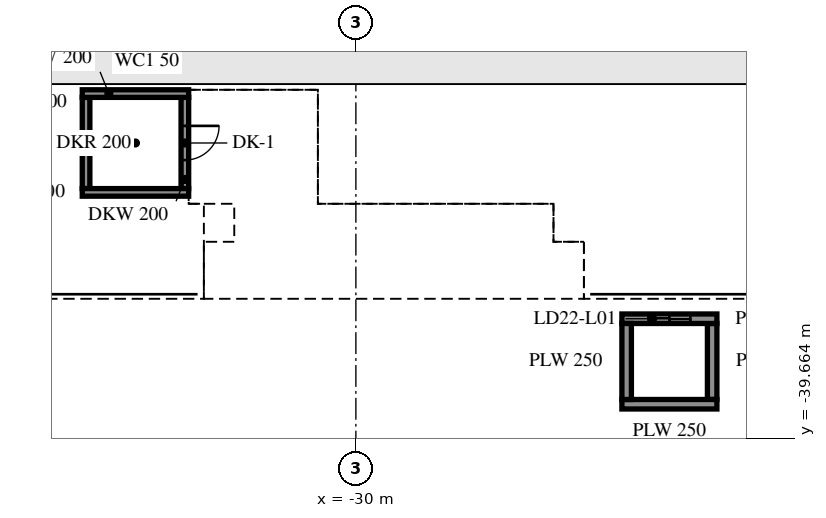
"""IFC4 building model, lengths in metres.
Left out: names, types, materials, properties, quantities, classifications, styles, units other than length and angle.
Written with IfcOpenShell. Run it as: python <this file> out.ifc"""

import sys

from ifc_helpers import new_model, si_unit, direction, frame, frame_2d, origin, place, context, subcontext, project, spatial, polyline, rectangle, outline, extrude, element, fill, save


model = new_model("IFC4")
c1 = context("Model", 3, precision=1e-05, world=origin(), true_north=direction((0.0, 1.0)))
c2 = subcontext(c1, "Body", "Model", "MODEL_VIEW")
j1 = project(units=[si_unit("LENGTHUNIT", "METRE"), si_unit("PLANEANGLEUNIT", "RADIAN")], contexts=[c1])
p1 = place(None, origin())
s1 = spatial("IfcSite", under=j1, at=p1, CompositionType="ELEMENT")
p2 = place(p1, origin())
s2 = spatial("IfcBuilding", under=s1, at=p2, CompositionType="ELEMENT")
p3 = place(p2, frame((0.0, 0.0, 7.2)))
s3 = spatial("IfcBuildingStorey", under=s2, at=p3, CompositionType="ELEMENT", Elevation=7.2)
p4 = place(p3, origin())
e1 = element("IfcWall", 1, at=p4, inside=s3, PredefinedType="NOTDEFINED", context=c2, shape_type="SweptSolid", body=[
    extrude(outline(polyline([(-37.0, -34.5), (-34.0, -34.5), (-34.0, -34.0), (-37.0, -34.0), (-37.0, -34.5)])), origin(), (0.0, 0.0, 1.0), 11.34),
])
p5 = place(p3, origin())
e2 = element("IfcWall", 2, at=p5, inside=s3, PredefinedType="NOTDEFINED", context=c2, shape_type="SweptSolid", body=[
    extrude(outline(polyline([(-24.0, -34.5), (-21.0, -34.5), (-21.0, -34.0), (-24.0, -34.0), (-24.0, -34.5)])), origin(), (0.0, 0.0, 1.0), 11.34),
])
p6 = place(p3, frame((0.0, 0.0, 11.34)))
e3 = element("IfcWall", 3, at=p6, inside=s3, PredefinedType="NOTDEFINED", context=c2, shape_type="SweptSolid", body=[
    extrude(outline(polyline([(-37.0, -34.5), (-33.982, -34.5), (-33.982, -34.0), (-37.0, -34.0), (-37.0, -34.5)])), origin(), (0.0, 0.0, 1.0), 0.6),
])
p7 = place(p3, frame((0.0, 0.0, 11.34)))
e4 = element("IfcWall", 4, at=p7, inside=s3, PredefinedType="NOTDEFINED", context=c2, shape_type="SweptSolid", body=[
    extrude(outline(polyline([(-24.018, -34.5), (-21.0, -34.5), (-21.0, -34.0), (-24.018, -34.0), (-24.018, -34.5)])), origin(), (0.0, 0.0, 1.0), 0.6),
])
p8 = place(p3, frame((0.0, 0.0, 11.94)))
e5 = element("IfcWall", 5, at=p8, inside=s3, PredefinedType="NOTDEFINED", context=c2, shape_type="SweptSolid", body=[
    extrude(outline(polyline([(-37.0, -34.5), (-33.928, -34.5), (-33.928, -34.0), (-37.0, -34.0), (-37.0, -34.5)])), origin(), (0.0, 0.0, 1.0), 0.6),
])
p9 = place(p3, frame((0.0, 0.0, 11.94)))
e6 = element("IfcWall", 6, at=p9, inside=s3, PredefinedType="NOTDEFINED", context=c2, shape_type="SweptSolid", body=[
    extrude(outline(polyline([(-24.072, -34.5), (-21.0, -34.5), (-21.0, -34.0), (-24.072, -34.0), (-24.072, -34.5)])), origin(), (0.0, 0.0, 1.0), 0.6),
])
p10 = place(p3, frame((0.0, 0.0, 12.54)))
e7 = element("IfcWall", 7, at=p10, inside=s3, PredefinedType="NOTDEFINED", context=c2, shape_type="SweptSolid", body=[
    extrude(outline(polyline([(-37.0, -34.5), (-33.837, -34.5), (-33.837, -34.0), (-37.0, -34.0), (-37.0, -34.5)])), origin(), (0.0, 0.0, 1.0), 0.6),
])
p11 = place(p3, frame((0.0, 0.0, 12.54)))
e8 = element("IfcWall", 8, at=p11, inside=s3, PredefinedType="NOTDEFINED", context=c2, shape_type="SweptSolid", body=[
    extrude(outline(polyline([(-24.163, -34.5), (-21.0, -34.5), (-21.0, -34.0), (-24.163, -34.0), (-24.163, -34.5)])), origin(), (0.0, 0.0, 1.0), 0.6),
])
p12 = place(p3, frame((0.0, 0.0, 13.14)))
e9 = element("IfcWall", 9, at=p12, inside=s3, PredefinedType="NOTDEFINED", context=c2, shape_type="SweptSolid", body=[
    extrude(outline(polyline([(-37.0, -34.5), (-33.708, -34.5), (-33.708, -34.0), (-37.0, -34.0), (-37.0, -34.5)])), origin(), (0.0, 0.0, 1.0), 0.6),
])
p13 = place(p3, frame((0.0, 0.0, 13.14)))
e10 = element("IfcWall", 10, at=p13, inside=s3, PredefinedType="NOTDEFINED", context=c2, shape_type="SweptSolid", body=[
    extrude(outline(polyline([(-24.292, -34.5), (-21.0, -34.5), (-21.0, -34.0), (-24.292, -34.0), (-24.292, -34.5)])), origin(), (0.0, 0.0, 1.0), 0.6),
])
p14 = place(p3, frame((0.0, 0.0, 13.74)))
e11 = element("IfcWall", 11, at=p14, inside=s3, PredefinedType="NOTDEFINED", context=c2, shape_type="SweptSolid", body=[
    extrude(outline(polyline([(-37.0, -34.5), (-33.539, -34.5), (-33.539, -34.0), (-37.0, -34.0), (-37.0, -34.5)])), origin(), (0.0, 0.0, 1.0), 0.6),
])
p15 = place(p3, frame((0.0, 0.0, 13.74)))
e12 = element("IfcWall", 12, at=p15, inside=s3, PredefinedType="NOTDEFINED", context=c2, shape_type="SweptSolid", body=[
    extrude(outline(polyline([(-24.461, -34.5), (-21.0, -34.5), (-21.0, -34.0), (-24.461, -34.0), (-24.461, -34.5)])), origin(), (0.0, 0.0, 1.0), 0.6),
])
p16 = place(p3, frame((0.0, 0.0, 14.34)))
e13 = element("IfcWall", 13, at=p16, inside=s3, PredefinedType="NOTDEFINED", context=c2, shape_type="SweptSolid", body=[
    extrude(outline(polyline([(-37.0, -34.5), (-33.33, -34.5), (-33.33, -34.0), (-37.0, -34.0), (-37.0, -34.5)])), origin(), (0.0, 0.0, 1.0), 0.6),
])
p17 = place(p3, frame((0.0, 0.0, 14.34)))
e14 = element("IfcWall", 14, at=p17, inside=s3, PredefinedType="NOTDEFINED", context=c2, shape_type="SweptSolid", body=[
    extrude(outline(polyline([(-24.67, -34.5), (-21.0, -34.5), (-21.0, -34.0), (-24.67, -34.0), (-24.67, -34.5)])), origin(), (0.0, 0.0, 1.0), 0.6),
])
p18 = place(p3, frame((0.0, 0.0, 14.94)))
e15 = element("IfcWall", 15, at=p18, inside=s3, PredefinedType="NOTDEFINED", context=c2, shape_type="SweptSolid", body=[
    extrude(outline(polyline([(-37.0, -34.5), (-33.075, -34.5), (-33.075, -34.0), (-37.0, -34.0), (-37.0, -34.5)])), origin(), (0.0, 0.0, 1.0), 0.6),
])
p19 = place(p3, frame((0.0, 0.0, 14.94)))
e16 = element("IfcWall", 16, at=p19, inside=s3, PredefinedType="NOTDEFINED", context=c2, shape_type="SweptSolid", body=[
    extrude(outline(polyline([(-24.925, -34.5), (-21.0, -34.5), (-21.0, -34.0), (-24.925, -34.0), (-24.925, -34.5)])), origin(), (0.0, 0.0, 1.0), 0.6),
])
p20 = place(p3, frame((0.0, 0.0, 15.54)))
e17 = element("IfcWall", 17, at=p20, inside=s3, PredefinedType="NOTDEFINED", context=c2, shape_type="SweptSolid", body=[
    extrude(outline(polyline([(-37.0, -34.5), (-32.773, -34.5), (-32.773, -34.0), (-37.0, -34.0), (-37.0, -34.5)])), origin(), (0.0, 0.0, 1.0), 0.6),
])
p21 = place(p3, frame((0.0, 0.0, 15.54)))
e18 = element("IfcWall", 18, at=p21, inside=s3, PredefinedType="NOTDEFINED", context=c2, shape_type="SweptSolid", body=[
    extrude(outline(polyline([(-25.227, -34.5), (-21.0, -34.5), (-21.0, -34.0), (-25.227, -34.0), (-25.227, -34.5)])), origin(), (0.0, 0.0, 1.0), 0.6),
])
p22 = place(p3, frame((0.0, 0.0, 16.14)))
e19 = element("IfcWall", 19, at=p22, inside=s3, PredefinedType="NOTDEFINED", context=c2, shape_type="SweptSolid", body=[
    extrude(outline(polyline([(-37.0, -34.5), (-32.417, -34.5), (-32.417, -34.0), (-37.0, -34.0), (-37.0, -34.5)])), origin(), (0.0, 0.0, 1.0), 0.6),
])
p23 = place(p3, frame((0.0, 0.0, 16.14)))
e20 = element("IfcWall", 20, at=p23, inside=s3, PredefinedType="NOTDEFINED", context=c2, shape_type="SweptSolid", body=[
    extrude(outline(polyline([(-25.583, -34.5), (-21.0, -34.5), (-21.0, -34.0), (-25.583, -34.0), (-25.583, -34.5)])), origin(), (0.0, 0.0, 1.0), 0.6),
])
p24 = place(p3, frame((0.0, 0.0, 16.74)))
e21 = element("IfcWall", 21, at=p24, inside=s3, PredefinedType="NOTDEFINED", context=c2, shape_type="SweptSolid", body=[
    extrude(outline(polyline([(-37.0, -34.5), (-32.0, -34.5), (-32.0, -34.0), (-37.0, -34.0), (-37.0, -34.5)])), origin(), (0.0, 0.0, 1.0), 0.6),
])
p25 = place(p3, frame((0.0, 0.0, 16.74)))
e22 = element("IfcWall", 22, at=p25, inside=s3, PredefinedType="NOTDEFINED", context=c2, shape_type="SweptSolid", body=[
    extrude(outline(polyline([(-26.0, -34.5), (-21.0, -34.5), (-21.0, -34.0), (-26.0, -34.0), (-26.0, -34.5)])), origin(), (0.0, 0.0, 1.0), 0.6),
])
p26 = place(p3, frame((0.0, 0.0, 17.34)))
e23 = element("IfcWall", 23, at=p26, inside=s3, PredefinedType="NOTDEFINED", context=c2, shape_type="SweptSolid", body=[
    extrude(outline(polyline([(-37.0, -34.5), (-31.513, -34.5), (-31.513, -34.0), (-37.0, -34.0), (-37.0, -34.5)])), origin(), (0.0, 0.0, 1.0), 0.6),
])
p27 = place(p3, frame((0.0, 0.0, 17.34)))
e24 = element("IfcWall", 24, at=p27, inside=s3, PredefinedType="NOTDEFINED", context=c2, shape_type="SweptSolid", body=[
    extrude(outline(polyline([(-26.487, -34.5), (-21.0, -34.5), (-21.0, -34.0), (-26.487, -34.0), (-26.487, -34.5)])), origin(), (0.0, 0.0, 1.0), 0.6),
])
p28 = place(p3, frame((0.0, 0.0, 17.94)))
e25 = element("IfcWall", 25, at=p28, inside=s3, PredefinedType="NOTDEFINED", context=c2, shape_type="SweptSolid", body=[
    extrude(outline(polyline([(-37.0, -34.5), (-30.94, -34.5), (-30.94, -34.0), (-37.0, -34.0), (-37.0, -34.5)])), origin(), (0.0, 0.0, 1.0), 0.6),
])
p29 = place(p3, frame((0.0, 0.0, 17.94)))
e26 = element("IfcWall", 26, at=p29, inside=s3, PredefinedType="NOTDEFINED", context=c2, shape_type="SweptSolid", body=[
    extrude(outline(polyline([(-27.06, -34.5), (-21.0, -34.5), (-21.0, -34.0), (-27.06, -34.0), (-27.06, -34.5)])), origin(), (0.0, 0.0, 1.0), 0.6),
])
p30 = place(p3, frame((0.0, 0.0, 18.54)))
e27 = element("IfcWall", 27, at=p30, inside=s3, PredefinedType="NOTDEFINED", context=c2, shape_type="SweptSolid", body=[
    extrude(outline(polyline([(-37.0, -34.5), (-30.258, -34.5), (-30.258, -34.0), (-37.0, -34.0), (-37.0, -34.5)])), origin(), (0.0, 0.0, 1.0), 0.6),
])
p31 = place(p3, frame((0.0, 0.0, 18.54)))
e28 = element("IfcWall", 28, at=p31, inside=s3, PredefinedType="NOTDEFINED", context=c2, shape_type="SweptSolid", body=[
    extrude(outline(polyline([(-27.742, -34.5), (-21.0, -34.5), (-21.0, -34.0), (-27.742, -34.0), (-27.742, -34.5)])), origin(), (0.0, 0.0, 1.0), 0.6),
])
p32 = place(p3, frame((0.0, 0.0, 19.14)))
e29 = element("IfcWall", 29, at=p32, inside=s3, PredefinedType="NOTDEFINED", context=c2, shape_type="SweptSolid", body=[
    extrude(outline(polyline([(-37.0, -34.5), (-29.426, -34.5), (-29.426, -34.0), (-37.0, -34.0), (-37.0, -34.5)])), origin(), (0.0, 0.0, 1.0), 0.6),
])
p33 = place(p3, frame((0.0, 0.0, 19.14)))
e30 = element("IfcWall", 30, at=p33, inside=s3, PredefinedType="NOTDEFINED", context=c2, shape_type="SweptSolid", body=[
    extrude(outline(polyline([(-28.574, -34.5), (-21.0, -34.5), (-21.0, -34.0), (-28.574, -34.0), (-28.574, -34.5)])), origin(), (0.0, 0.0, 1.0), 0.6),
])
p34 = place(p3, frame((0.0, 0.0, 19.74)))
e31 = element("IfcWall", 31, at=p34, inside=s3, PredefinedType="NOTDEFINED", context=c2, shape_type="SweptSolid", body=[
    extrude(outline(polyline([(-37.0, -34.5), (-21.0, -34.5), (-21.0, -34.0), (-37.0, -34.0), (-37.0, -34.5)])), origin(), (0.0, 0.0, 1.0), 0.26),
])
p35 = place(p3, origin())
e32 = element("IfcWall", 32, at=p35, inside=s3, PredefinedType="NOTDEFINED", context=c2, shape_type="SweptSolid", body=[
    extrude(outline(polyline([(-37.0, -34.0), (-33.2, -34.0), (-33.2, -33.5), (-37.0, -33.5), (-37.0, -34.0)])), origin(), (0.0, 0.0, 1.0), 12.725),
])
p36 = place(p3, origin())
e33 = element("IfcWall", 33, at=p36, inside=s3, PredefinedType="NOTDEFINED", context=c2, shape_type="SweptSolid", body=[
    extrude(outline(polyline([(-24.8, -34.0), (-21.0, -34.0), (-21.0, -33.5), (-24.8, -33.5), (-24.8, -34.0)])), origin(), (0.0, 0.0, 1.0), 12.725),
])
p37 = place(p3, frame((0.0, 0.0, 12.725)))
e34 = element("IfcWall", 34, at=p37, inside=s3, PredefinedType="NOTDEFINED", context=c2, shape_type="SweptSolid", body=[
    extrude(outline(polyline([(-37.0, -34.0), (-33.179, -34.0), (-33.179, -33.5), (-37.0, -33.5), (-37.0, -34.0)])), origin(), (0.0, 0.0, 1.0), 0.6),
])
p38 = place(p3, frame((0.0, 0.0, 12.725)))
e35 = element("IfcWall", 35, at=p38, inside=s3, PredefinedType="NOTDEFINED", context=c2, shape_type="SweptSolid", body=[
    extrude(outline(polyline([(-24.821, -34.0), (-21.0, -34.0), (-21.0, -33.5), (-24.821, -33.5), (-24.821, -34.0)])), origin(), (0.0, 0.0, 1.0), 0.6),
])
p39 = place(p3, frame((0.0, 0.0, 13.325)))
e36 = element("IfcWall", 36, at=p39, inside=s3, PredefinedType="NOTDEFINED", context=c2, shape_type="SweptSolid", body=[
    extrude(outline(polyline([(-37.0, -34.0), (-33.114, -34.0), (-33.114, -33.5), (-37.0, -33.5), (-37.0, -34.0)])), origin(), (0.0, 0.0, 1.0), 0.6),
])
p40 = place(p3, frame((0.0, 0.0, 13.325)))
e37 = element("IfcWall", 37, at=p40, inside=s3, PredefinedType="NOTDEFINED", context=c2, shape_type="SweptSolid", body=[
    extrude(outline(polyline([(-24.886, -34.0), (-21.0, -34.0), (-21.0, -33.5), (-24.886, -33.5), (-24.886, -34.0)])), origin(), (0.0, 0.0, 1.0), 0.6),
])
p41 = place(p3, frame((0.0, 0.0, 13.926)))
e38 = element("IfcWall", 38, at=p41, inside=s3, PredefinedType="NOTDEFINED", context=c2, shape_type="SweptSolid", body=[
    extrude(outline(polyline([(-37.0, -34.0), (-33.005, -34.0), (-33.005, -33.5), (-37.0, -33.5), (-37.0, -34.0)])), origin(), (0.0, 0.0, 1.0), 0.6),
])
p42 = place(p3, frame((0.0, 0.0, 13.926)))
e39 = element("IfcWall", 39, at=p42, inside=s3, PredefinedType="NOTDEFINED", context=c2, shape_type="SweptSolid", body=[
    extrude(outline(polyline([(-24.995, -34.0), (-21.0, -34.0), (-21.0, -33.5), (-24.995, -33.5), (-24.995, -34.0)])), origin(), (0.0, 0.0, 1.0), 0.6),
])
p43 = place(p3, frame((0.0, 0.0, 14.525)))
e40 = element("IfcWall", 40, at=p43, inside=s3, PredefinedType="NOTDEFINED", context=c2, shape_type="SweptSolid", body=[
    extrude(outline(polyline([(-37.0, -34.0), (-32.85, -34.0), (-32.85, -33.5), (-37.0, -33.5), (-37.0, -34.0)])), origin(), (0.0, 0.0, 1.0), 0.6),
])
p44 = place(p3, frame((0.0, 0.0, 14.525)))
e41 = element("IfcWall", 41, at=p44, inside=s3, PredefinedType="NOTDEFINED", context=c2, shape_type="SweptSolid", body=[
    extrude(outline(polyline([(-25.15, -34.0), (-21.0, -34.0), (-21.0, -33.5), (-25.15, -33.5), (-25.15, -34.0)])), origin(), (0.0, 0.0, 1.0), 0.6),
])
p45 = place(p3, frame((0.0, 0.0, 15.125)))
e42 = element("IfcWall", 42, at=p45, inside=s3, PredefinedType="NOTDEFINED", context=c2, shape_type="SweptSolid", body=[
    extrude(outline(polyline([(-37.0, -34.0), (-32.646, -34.0), (-32.646, -33.5), (-37.0, -33.5), (-37.0, -34.0)])), origin(), (0.0, 0.0, 1.0), 0.6),
])
p46 = place(p3, frame((0.0, 0.0, 15.125)))
e43 = element("IfcWall", 43, at=p46, inside=s3, PredefinedType="NOTDEFINED", context=c2, shape_type="SweptSolid", body=[
    extrude(outline(polyline([(-25.354, -34.0), (-21.0, -34.0), (-21.0, -33.5), (-25.354, -33.5), (-25.354, -34.0)])), origin(), (0.0, 0.0, 1.0), 0.6),
])
p47 = place(p3, frame((0.0, 0.0, 15.725)))
e44 = element("IfcWall", 44, at=p47, inside=s3, PredefinedType="NOTDEFINED", context=c2, shape_type="SweptSolid", body=[
    extrude(outline(polyline([(-37.0, -34.0), (-32.389, -34.0), (-32.389, -33.5), (-37.0, -33.5), (-37.0, -34.0)])), origin(), (0.0, 0.0, 1.0), 0.6),
])
p48 = place(p3, frame((0.0, 0.0, 15.725)))
e45 = element("IfcWall", 45, at=p48, inside=s3, PredefinedType="NOTDEFINED", context=c2, shape_type="SweptSolid", body=[
    extrude(outline(polyline([(-25.611, -34.0), (-21.0, -34.0), (-21.0, -33.5), (-25.611, -33.5), (-25.611, -34.0)])), origin(), (0.0, 0.0, 1.0), 0.6),
])
p49 = place(p3, frame((0.0, 0.0, 16.325)))
e46 = element("IfcWall", 46, at=p49, inside=s3, PredefinedType="NOTDEFINED", context=c2, shape_type="SweptSolid", body=[
    extrude(outline(polyline([(-37.0, -34.0), (-32.075, -34.0), (-32.075, -33.5), (-37.0, -33.5), (-37.0, -34.0)])), origin(), (0.0, 0.0, 1.0), 0.6),
])
p50 = place(p3, frame((0.0, 0.0, 16.325)))
e47 = element("IfcWall", 47, at=p50, inside=s3, PredefinedType="NOTDEFINED", context=c2, shape_type="SweptSolid", body=[
    extrude(outline(polyline([(-25.925, -34.0), (-21.0, -34.0), (-21.0, -33.5), (-25.925, -33.5), (-25.925, -34.0)])), origin(), (0.0, 0.0, 1.0), 0.6),
])
p51 = place(p3, frame((0.0, 0.0, 16.926)))
e48 = element("IfcWall", 48, at=p51, inside=s3, PredefinedType="NOTDEFINED", context=c2, shape_type="SweptSolid", body=[
    extrude(outline(polyline([(-37.0, -34.0), (-31.693, -34.0), (-31.693, -33.5), (-37.0, -33.5), (-37.0, -34.0)])), origin(), (0.0, 0.0, 1.0), 0.6),
])
p52 = place(p3, frame((0.0, 0.0, 16.926)))
e49 = element("IfcWall", 49, at=p52, inside=s3, PredefinedType="NOTDEFINED", context=c2, shape_type="SweptSolid", body=[
    extrude(outline(polyline([(-26.307, -34.0), (-21.0, -34.0), (-21.0, -33.5), (-26.307, -33.5), (-26.307, -34.0)])), origin(), (0.0, 0.0, 1.0), 0.6),
])
p53 = place(p3, frame((0.0, 0.0, 17.525)))
e50 = element("IfcWall", 50, at=p53, inside=s3, PredefinedType="NOTDEFINED", context=c2, shape_type="SweptSolid", body=[
    extrude(outline(polyline([(-37.0, -34.0), (-31.234, -34.0), (-31.234, -33.5), (-37.0, -33.5), (-37.0, -34.0)])), origin(), (0.0, 0.0, 1.0), 0.6),
])
p54 = place(p3, frame((0.0, 0.0, 17.525)))
e51 = element("IfcWall", 51, at=p54, inside=s3, PredefinedType="NOTDEFINED", context=c2, shape_type="SweptSolid", body=[
    extrude(outline(polyline([(-26.766, -34.0), (-21.0, -34.0), (-21.0, -33.5), (-26.766, -33.5), (-26.766, -34.0)])), origin(), (0.0, 0.0, 1.0), 0.6),
])
p55 = place(p3, frame((0.0, 0.0, 18.125)))
e52 = element("IfcWall", 52, at=p55, inside=s3, PredefinedType="NOTDEFINED", context=c2, shape_type="SweptSolid", body=[
    extrude(outline(polyline([(-37.0, -34.0), (-30.679, -34.0), (-30.679, -33.5), (-37.0, -33.5), (-37.0, -34.0)])), origin(), (0.0, 0.0, 1.0), 0.6),
])
p56 = place(p3, frame((0.0, 0.0, 18.125)))
e53 = element("IfcWall", 53, at=p56, inside=s3, PredefinedType="NOTDEFINED", context=c2, shape_type="SweptSolid", body=[
    extrude(outline(polyline([(-27.321, -34.0), (-21.0, -34.0), (-21.0, -33.5), (-27.321, -33.5), (-27.321, -34.0)])), origin(), (0.0, 0.0, 1.0), 0.6),
])
p57 = place(p3, frame((0.0, 0.0, 18.725)))
e54 = element("IfcWall", 54, at=p57, inside=s3, PredefinedType="NOTDEFINED", context=c2, shape_type="SweptSolid", body=[
    extrude(outline(polyline([(-37.0, -34.0), (-29.996, -34.0), (-29.996, -33.5), (-37.0, -33.5), (-37.0, -34.0)])), origin(), (0.0, 0.0, 1.0), 0.6),
])
p58 = place(p3, frame((0.0, 0.0, 18.725)))
e55 = element("IfcWall", 55, at=p58, inside=s3, PredefinedType="NOTDEFINED", context=c2, shape_type="SweptSolid", body=[
    extrude(outline(polyline([(-28.004, -34.0), (-21.0, -34.0), (-21.0, -33.5), (-28.004, -33.5), (-28.004, -34.0)])), origin(), (0.0, 0.0, 1.0), 0.6),
])
p59 = place(p3, frame((0.0, 0.0, 19.325)))
e56 = element("IfcWall", 56, at=p59, inside=s3, PredefinedType="NOTDEFINED", context=c2, shape_type="SweptSolid", body=[
    extrude(outline(polyline([(-37.0, -34.0), (-21.0, -34.0), (-21.0, -33.5), (-37.0, -33.5), (-37.0, -34.0)])), origin(), (0.0, 0.0, 1.0), 0.6),
])
p60 = place(p3, frame((0.0, 0.0, 19.926)))
e57 = element("IfcWall", 57, at=p60, inside=s3, PredefinedType="NOTDEFINED", context=c2, shape_type="SweptSolid", body=[
    extrude(outline(polyline([(-37.0, -34.0), (-21.0, -34.0), (-21.0, -33.5), (-37.0, -33.5), (-37.0, -34.0)])), origin(), (0.0, 0.0, 1.0), 0.074),
])
p61 = place(p3, frame((-20.5, -38.775, 0.0), z_axis=(0.0, 0.0, 1.0), x_axis=(-1.0, 0.0, 0.0)))
e58 = element("IfcWall", 58, at=p61, inside=s3, PredefinedType="SOLIDWALL", context=c2, shape_type="SweptSolid", body=[
    extrude(rectangle(XDim=2.5, YDim=0.25, at=frame_2d((1.25, 0.0))), origin(), (0.0, 0.0, 1.0), 4.4),
])
p62 = place(p3, frame((-23.0, -36.525, 0.0), z_axis=(0.0, 0.0, 1.0), x_axis=(1.0, 0.0, 0.0)))
e59 = element("IfcWall", 59, at=p62, inside=s3, PredefinedType="SOLIDWALL", context=c2, shape_type="SweptSolid", body=[
    extrude(rectangle(XDim=2.5, YDim=0.25, at=frame_2d((1.25, 0.0))), origin(), (0.0, 0.0, 1.0), 4.4),
])
p63 = place(p62, frame((0.7, 0.0, 0.0)))
e60 = element("IfcOpeningElement", 60, at=p63, cuts=e59, PredefinedType="OPENING", context=c2, shape_type="SweptSolid", body=[
    extrude(rectangle(XDim=1.1, YDim=2.1, at=frame_2d((0.55, 1.05))), frame((0.0, 0.135, 0.0), z_axis=(0.0, -1.0, 0.0), x_axis=(1.0, 0.0, 0.0)), (0.0, 0.0, 1.0), 0.27),
])
for number, where, z_axis, x_axis in (
    (61, (-22.875, -38.65, 0.0), (0.0, 0.0, 1.0), (0.0, 1.0, 0.0)),
    (62, (-20.625, -36.65, 0.0), (0.0, 0.0, 1.0), (0.0, -1.0, 0.0)),
):
    element("IfcWall", number, at=place(p3, frame(where, z_axis=z_axis, x_axis=x_axis)), inside=s3, PredefinedType="SOLIDWALL", context=c2, shape_type="SweptSolid", body=[
        extrude(rectangle(XDim=2.0, YDim=0.25, at=frame_2d((1.0, 0.0))), origin(), (0.0, 0.0, 1.0), 4.4),
    ])
for number, where, z_axis, x_axis in (
    (63, (-37.2, -33.2, 0.0), (0.0, 0.0, 1.0), (1.0, 0.0, 0.0)),
    (64, (-37.2, -30.6, 0.0), (0.0, 0.0, 1.0), (1.0, 0.0, 0.0)),
):
    element("IfcWall", number, at=place(p3, frame(where, z_axis=z_axis, x_axis=x_axis)), inside=s3, PredefinedType="SOLIDWALL", context=c2, shape_type="SweptSolid", body=[
        extrude(rectangle(XDim=2.8, YDim=0.2, at=frame_2d((1.4, 0.0))), origin(), (0.0, 0.0, 1.0), 2.9),
    ])
p64 = place(p3, frame((-34.5, -30.7, 0.0), z_axis=(0.0, 0.0, 1.0), x_axis=(0.0, -1.0, 0.0)))
e65 = element("IfcWall", 65, at=p64, inside=s3, PredefinedType="SOLIDWALL", context=c2, shape_type="SweptSolid", body=[
    extrude(rectangle(XDim=2.4, YDim=0.2, at=frame_2d((1.2, 0.0))), origin(), (0.0, 0.0, 1.0), 2.9),
])
p65 = place(p64, frame((0.75, 0.0, 0.0)))
e66 = element("IfcOpeningElement", 66, at=p65, cuts=e65, PredefinedType="OPENING", context=c2, shape_type="SweptSolid", body=[
    extrude(rectangle(XDim=0.9, YDim=2.1, at=frame_2d((0.45, 1.05))), frame((0.0, 0.11, 0.0), z_axis=(0.0, -1.0, 0.0), x_axis=(1.0, 0.0, 0.0)), (0.0, 0.0, 1.0), 0.22),
])
p66 = place(p3, frame((-37.1, -33.1, 0.0), z_axis=(0.0, 0.0, 1.0), x_axis=(0.0, 1.0, 0.0)))
e67 = element("IfcWall", 67, at=p66, inside=s3, PredefinedType="SOLIDWALL", context=c2, shape_type="SweptSolid", body=[
    extrude(rectangle(XDim=2.4, YDim=0.2, at=frame_2d((1.2, 0.0))), origin(), (0.0, 0.0, 1.0), 2.9),
])
p67 = place(p63, origin())
e68 = element("IfcDoor", 68, at=p67, inside=s3, OperationType="DOUBLE_DOOR_SLIDING", PredefinedType="DOOR", context=c2, shape_type="SweptSolid", body=[
    extrude(rectangle(XDim=1.1, YDim=2.1, at=frame_2d((0.55, 1.05))), frame((0.0, 0.025, 0.0), z_axis=(0.0, -1.0, 0.0), x_axis=(1.0, 0.0, 0.0)), (0.0, 0.0, 1.0), 0.05),
])
fill(e60, e68)
p68 = place(p65, origin())
e69 = element("IfcDoor", 69, at=p68, inside=s3, OperationType="SINGLE_SWING_LEFT", PredefinedType="DOOR", context=c2, shape_type="SweptSolid", body=[
    extrude(rectangle(XDim=0.9, YDim=2.1, at=frame_2d((0.45, 1.05))), frame((0.0, 0.025, 0.0), z_axis=(0.0, -1.0, 0.0), x_axis=(1.0, 0.0, 0.0)), (0.0, 0.0, 1.0), 0.05),
])
fill(e66, e69)
save(model, sys.argv[1])
